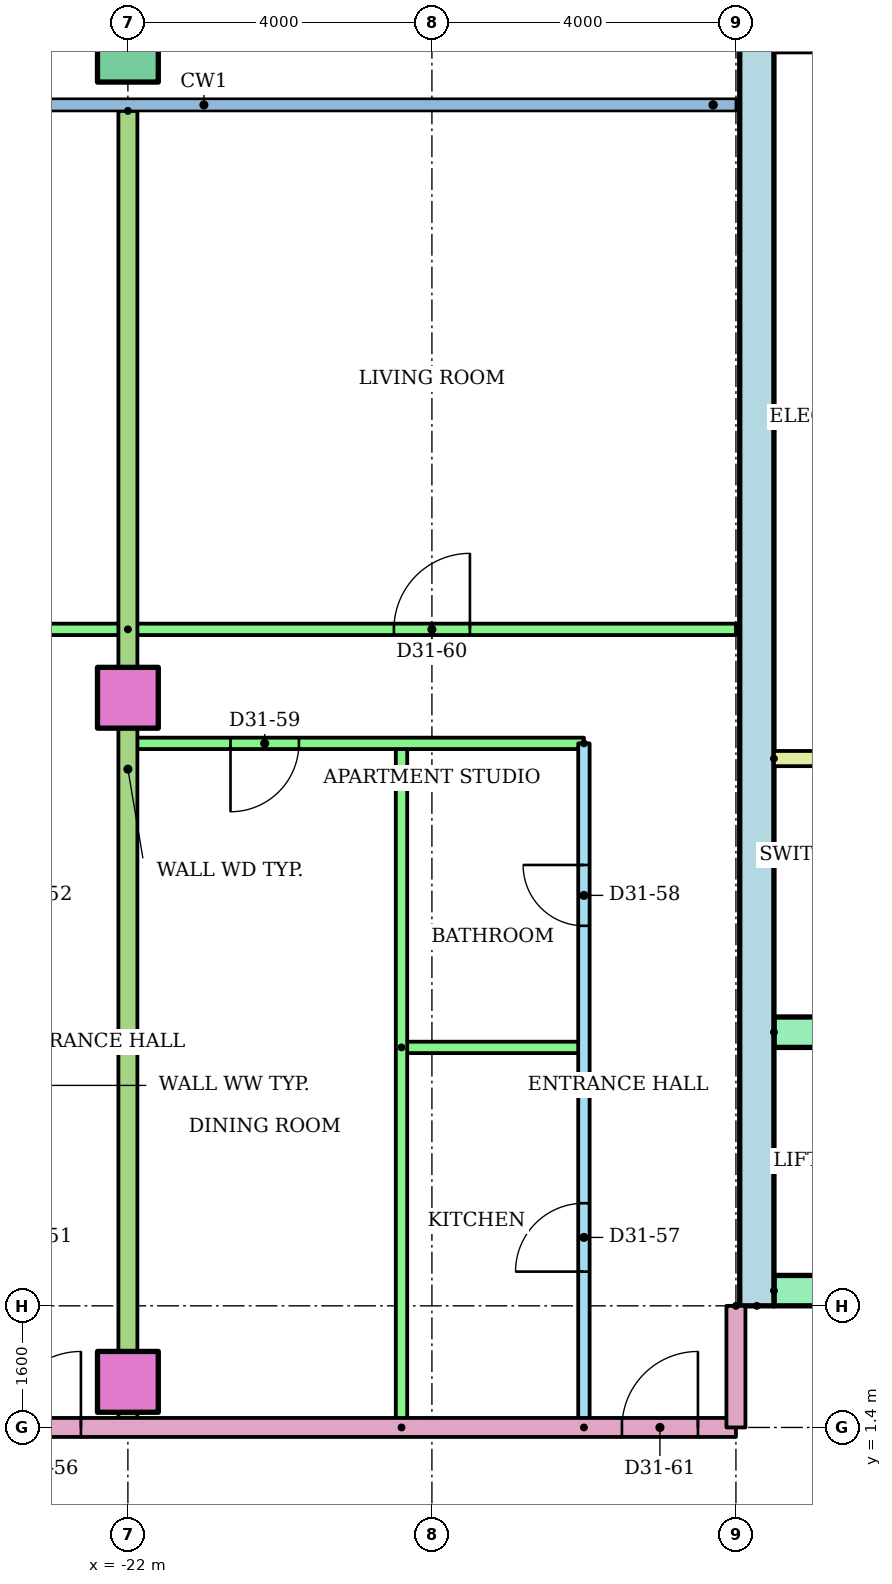
"""IFC4 building model, lengths in metres.
Left out: names, types, materials, properties, quantities, classifications, styles, units other than length and angle.
Written with IfcOpenShell. Run it as: python <this file> out.ifc"""

import sys

from ifc_helpers import new_model, si_unit, direction, frame, frame_2d, origin, origin_2d, place, context, subcontext, project, spatial, rectangle, hollow_rectangle, extrude, element, fill, save


model = new_model("IFC4")
c1 = context("Model", 3, precision=1e-05, world=origin(), true_north=direction((0.0, 1.0)))
c2 = subcontext(c1, "Body", "Model", "MODEL_VIEW")
j1 = project(units=[si_unit("LENGTHUNIT", "METRE"), si_unit("PLANEANGLEUNIT", "RADIAN")], contexts=[c1])
p1 = place(None, origin())
s1 = spatial("IfcSite", under=j1, at=p1, CompositionType="ELEMENT")
p2 = place(p1, origin())
s2 = spatial("IfcBuilding", under=s1, at=p2, CompositionType="ELEMENT")
p3 = place(p2, frame((0.0, 0.0, 123.0)))
s3 = spatial("IfcBuildingStorey", under=s2, at=p3, CompositionType="ELEMENT", Elevation=123.0)
for number, where in (
    (1, (-22.0, 2.0, 0.0)),
    (2, (-22.0, 11.0, 0.0)),
):
    element("IfcColumn", number, at=place(p3, frame(where)), inside=s3, PredefinedType="COLUMN", context=c2, shape_type="SweptSolid", body=[
        extrude(rectangle(XDim=0.8, YDim=0.8, at=origin_2d()), origin(), (0.0, 0.0, 1.0), 3.2),
    ])
p4 = place(p3, frame((-22.0, 19.5, 0.0)))
e3 = element("IfcColumn", 3, at=p4, inside=s3, PredefinedType="COLUMN", context=c2, shape_type="SweptSolid", body=[
    extrude(hollow_rectangle(XDim=0.8, YDim=0.8, WallThickness=0.04, at=origin_2d()), origin(), (0.0, 0.0, 1.0), 3.2),
])
p5 = place(p3, frame((-13.725, 3.0, 0.0), z_axis=(0.0, 0.0, 1.0), x_axis=(0.0, 1.0, 0.0)))
e4 = element("IfcWall", 4, at=p5, inside=s3, PredefinedType="SHEAR", context=c2, shape_type="SweptSolid", body=[
    extrude(rectangle(XDim=17.0, YDim=0.45, at=frame_2d((8.5, 0.0))), origin(), (0.0, 0.0, 1.0), 2.92),
])
p6 = place(p3, frame((-13.5, 3.2, 0.0)))
e5 = element("IfcWall", 5, at=p6, inside=s3, PredefinedType="SHEAR", context=c2, shape_type="SweptSolid", body=[
    extrude(rectangle(XDim=27.0, YDim=0.4, at=frame_2d((13.5, 0.0))), origin(), (0.0, 0.0, 1.0), 2.92),
])
p7 = place(p6, frame((6.861, 0.0, 0.0)))
e6 = element("IfcOpeningElement", 6, at=p7, cuts=e5, PredefinedType="OPENING", context=c2, shape_type="SweptSolid", body=[
    extrude(rectangle(XDim=1.1, YDim=2.1, at=frame_2d((0.55, 1.05))), frame((0.0, 0.21, 0.0), z_axis=(0.0, -1.0, 0.0), x_axis=(1.0, 0.0, 0.0)), (0.0, 0.0, 1.0), 0.42),
])
p8 = place(p6, frame((9.906, 0.0, 0.0)))
e7 = element("IfcOpeningElement", 7, at=p8, cuts=e5, PredefinedType="OPENING", context=c2, shape_type="SweptSolid", body=[
    extrude(rectangle(XDim=1.1, YDim=2.1, at=frame_2d((0.55, 1.05))), frame((0.0, 0.21, 0.0), z_axis=(0.0, -1.0, 0.0), x_axis=(1.0, 0.0, 0.0)), (0.0, 0.0, 1.0), 0.42),
])
p9 = place(p6, frame((15.994, 0.0, 0.0)))
e8 = element("IfcOpeningElement", 8, at=p9, cuts=e5, PredefinedType="OPENING", context=c2, shape_type="SweptSolid", body=[
    extrude(rectangle(XDim=1.1, YDim=2.1, at=frame_2d((0.55, 1.05))), frame((0.0, 0.21, 0.0), z_axis=(0.0, -1.0, 0.0), x_axis=(1.0, 0.0, 0.0)), (0.0, 0.0, 1.0), 0.42),
])
p10 = place(p6, frame((19.039, 0.0, 0.0)))
e9 = element("IfcOpeningElement", 9, at=p10, cuts=e5, PredefinedType="OPENING", context=c2, shape_type="SweptSolid", body=[
    extrude(rectangle(XDim=1.1, YDim=2.1, at=frame_2d((0.55, 1.05))), frame((0.0, 0.21, 0.0), z_axis=(0.0, -1.0, 0.0), x_axis=(1.0, 0.0, 0.0)), (0.0, 0.0, 1.0), 0.42),
])
p11 = place(p6, frame((12.6, 0.0, 0.0)))
e10 = element("IfcOpeningElement", 10, at=p11, cuts=e5, PredefinedType="OPENING", context=c2, shape_type="SweptSolid", body=[
    extrude(rectangle(XDim=1.8, YDim=2.1, at=frame_2d((0.9, 1.05))), frame((0.0, 0.21, 0.0), z_axis=(0.0, -1.0, 0.0), x_axis=(1.0, 0.0, 0.0)), (0.0, 0.0, 1.0), 0.42),
])
p12 = place(p3, frame((-13.5, 6.6, 0.0)))
e11 = element("IfcWall", 11, at=p12, inside=s3, PredefinedType="SHEAR", context=c2, shape_type="SweptSolid", body=[
    extrude(rectangle(XDim=11.978, YDim=0.4, at=frame_2d((5.989, 0.0))), origin(), (0.0, 0.0, 1.0), 2.92),
])
p13 = place(p3, frame((-13.5, 10.2, 0.0)))
e12 = element("IfcWall", 12, at=p13, inside=s3, PredefinedType="PARTITIONING", context=c2, shape_type="SweptSolid", body=[
    extrude(rectangle(XDim=3.9, YDim=0.2, at=frame_2d((1.95, 0.0))), origin(), (0.0, 0.0, 1.0), 2.92),
])
p14 = place(p3, frame((-32.72, 11.9, 0.0)))
e13 = element("IfcWall", 13, at=p14, inside=s3, PredefinedType="PARTITIONING", context=c2, shape_type="SweptSolid", body=[
    extrude(rectangle(XDim=10.72, YDim=0.15, at=frame_2d((5.36, 0.0))), origin(), (0.0, 0.0, 1.0), 2.4),
])
p15 = place(p14, frame((1.102, 0.0, 0.0)))
e14 = element("IfcOpeningElement", 14, at=p15, cuts=e13, PredefinedType="OPENING", context=c2, shape_type="SweptSolid", body=[
    extrude(rectangle(XDim=1.0, YDim=2.1, at=frame_2d((0.5, 1.05))), frame((0.0, 0.085, 0.0), z_axis=(0.0, -1.0, 0.0), x_axis=(1.0, 0.0, 0.0)), (0.0, 0.0, 1.0), 0.17),
])
p16 = place(p14, frame((7.22, 0.0, 0.0)))
e15 = element("IfcOpeningElement", 15, at=p16, cuts=e13, PredefinedType="OPENING", context=c2, shape_type="SweptSolid", body=[
    extrude(rectangle(XDim=1.0, YDim=2.1, at=frame_2d((0.5, 1.05))), frame((0.0, 0.085, 0.0), z_axis=(0.0, -1.0, 0.0), x_axis=(1.0, 0.0, 0.0)), (0.0, 0.0, 1.0), 0.17),
])
p17 = place(p3, frame((-16.0, 1.4, 0.0), z_axis=(0.0, 0.0, 1.0), x_axis=(0.0, 1.0, 0.0)))
e16 = element("IfcWall", 16, at=p17, inside=s3, PredefinedType="PARTITIONING", context=c2, shape_type="SweptSolid", body=[
    extrude(rectangle(XDim=9.0, YDim=0.15, at=frame_2d((4.5, 0.0))), origin(), (0.0, 0.0, 1.0), 2.4),
])
p18 = place(p17, frame((2.05, 0.0, 0.0)))
e17 = element("IfcOpeningElement", 17, at=p18, cuts=e16, PredefinedType="OPENING", context=c2, shape_type="SweptSolid", body=[
    extrude(rectangle(XDim=0.9, YDim=2.1, at=frame_2d((0.45, 1.05))), frame((0.0, 0.085, 0.0), z_axis=(0.0, -1.0, 0.0), x_axis=(1.0, 0.0, 0.0)), (0.0, 0.0, 1.0), 0.17),
])
p19 = place(p17, frame((6.6, 0.0, 0.0)))
e18 = element("IfcOpeningElement", 18, at=p19, cuts=e16, PredefinedType="OPENING", context=c2, shape_type="SweptSolid", body=[
    extrude(rectangle(XDim=0.8, YDim=2.1, at=frame_2d((0.4, 1.05))), frame((0.0, 0.085, 0.0), z_axis=(0.0, -1.0, 0.0), x_axis=(1.0, 0.0, 0.0)), (0.0, 0.0, 1.0), 0.17),
])
p20 = place(p3, frame((-18.4, 6.4, 0.0)))
e19 = element("IfcWall", 19, at=p20, inside=s3, PredefinedType="PARTITIONING", context=c2, shape_type="SweptSolid", body=[
    extrude(rectangle(XDim=2.4, YDim=0.15, at=frame_2d((1.2, 0.0))), origin(), (0.0, 0.0, 1.0), 2.4),
])
p21 = place(p3, frame((-18.4, 1.4, 0.0), z_axis=(0.0, 0.0, 1.0), x_axis=(0.0, 1.0, 0.0)))
e20 = element("IfcWall", 20, at=p21, inside=s3, PredefinedType="PARTITIONING", context=c2, shape_type="SweptSolid", body=[
    extrude(rectangle(XDim=9.0, YDim=0.15, at=frame_2d((4.5, 0.0))), origin(), (0.0, 0.0, 1.0), 2.4),
])
p22 = place(p3, frame((-16.0, 10.4, 0.0), z_axis=(0.0, 0.0, 1.0), x_axis=(-1.0, 0.0, 0.0)))
e21 = element("IfcWall", 21, at=p22, inside=s3, PredefinedType="PARTITIONING", context=c2, shape_type="SweptSolid", body=[
    extrude(rectangle(XDim=6.0, YDim=0.15, at=frame_2d((3.0, 0.0))), origin(), (0.0, 0.0, 1.0), 2.4),
])
p23 = place(p22, frame((3.75, 0.0, 0.0)))
e22 = element("IfcOpeningElement", 22, at=p23, cuts=e21, PredefinedType="OPENING", context=c2, shape_type="SweptSolid", body=[
    extrude(rectangle(XDim=0.9, YDim=2.1, at=frame_2d((0.45, 1.05))), frame((0.0, 0.085, 0.0), z_axis=(0.0, -1.0, 0.0), x_axis=(1.0, 0.0, 0.0)), (0.0, 0.0, 1.0), 0.17),
])
p24 = place(p3, frame((-22.0, 11.9, 0.0)))
e23 = element("IfcWall", 23, at=p24, inside=s3, PredefinedType="PARTITIONING", context=c2, shape_type="SweptSolid", body=[
    extrude(rectangle(XDim=8.0, YDim=0.15, at=frame_2d((4.0, 0.0))), origin(), (0.0, 0.0, 1.0), 2.4),
])
p25 = place(p24, frame((3.5, 0.0, 0.0)))
e24 = element("IfcOpeningElement", 24, at=p25, cuts=e23, PredefinedType="OPENING", context=c2, shape_type="SweptSolid", body=[
    extrude(rectangle(XDim=1.0, YDim=2.1, at=frame_2d((0.5, 1.05))), frame((0.0, 0.085, 0.0), z_axis=(0.0, -1.0, 0.0), x_axis=(1.0, 0.0, 0.0)), (0.0, 0.0, 1.0), 0.17),
])
p26 = place(p3, frame((-22.0, 18.721, 0.0), z_axis=(0.0, 0.0, 1.0), x_axis=(0.0, -1.0, 0.0)))
e25 = element("IfcWall", 25, at=p26, inside=s3, PredefinedType="PARTITIONING", context=c2, shape_type="SweptSolid", body=[
    extrude(rectangle(XDim=17.321, YDim=0.25, at=frame_2d((8.661, 0.0))), origin(), (0.0, 0.0, 1.0), 2.4),
])
p27 = place(p3, frame((-29.0, 1.4, 0.0)))
e26 = element("IfcWall", 26, at=p27, inside=s3, PredefinedType="PARTITIONING", context=c2, shape_type="SweptSolid", body=[
    extrude(rectangle(XDim=15.0, YDim=0.25, at=frame_2d((7.5, 0.0))), origin(), (0.0, 0.0, 1.0), 2.4),
])
p28 = place(p27, frame((5.382, 0.0, 0.0)))
e27 = element("IfcOpeningElement", 27, at=p28, cuts=e26, PredefinedType="OPENING", context=c2, shape_type="SweptSolid", body=[
    extrude(rectangle(XDim=1.0, YDim=2.1, at=frame_2d((0.5, 1.05))), frame((0.0, 0.135, 0.0), z_axis=(0.0, -1.0, 0.0), x_axis=(1.0, 0.0, 0.0)), (0.0, 0.0, 1.0), 0.27),
])
p29 = place(p27, frame((13.5, 0.0, 0.0)))
e28 = element("IfcOpeningElement", 28, at=p29, cuts=e26, PredefinedType="OPENING", context=c2, shape_type="SweptSolid", body=[
    extrude(rectangle(XDim=1.0, YDim=2.1, at=frame_2d((0.5, 1.05))), frame((0.0, 0.135, 0.0), z_axis=(0.0, -1.0, 0.0), x_axis=(1.0, 0.0, 0.0)), (0.0, 0.0, 1.0), 0.27),
])
p30 = place(p3, frame((-14.0, 3.0, 0.0), z_axis=(0.0, 0.0, 1.0), x_axis=(0.0, -1.0, 0.0)))
e29 = element("IfcWall", 29, at=p30, inside=s3, PredefinedType="PARTITIONING", context=c2, shape_type="SweptSolid", body=[
    extrude(rectangle(XDim=1.6, YDim=0.25, at=frame_2d((0.8, 0.0))), origin(), (0.0, 0.0, 1.0), 2.4),
])
p31 = place(p28, origin())
e30 = element("IfcDoor", 30, at=p31, inside=s3, OperationType="SINGLE_SWING_RIGHT", PredefinedType="DOOR", context=c2, shape_type="SweptSolid", body=[
    extrude(rectangle(XDim=1.0, YDim=2.1, at=frame_2d((0.5, 1.05))), frame((0.0, 0.025, 0.0), z_axis=(0.0, -1.0, 0.0), x_axis=(1.0, 0.0, 0.0)), (0.0, 0.0, 1.0), 0.05),
])
fill(e27, e30)
p32 = place(p18, origin())
e31 = element("IfcDoor", 31, at=p32, inside=s3, OperationType="SINGLE_SWING_LEFT", PredefinedType="DOOR", context=c2, shape_type="SweptSolid", body=[
    extrude(rectangle(XDim=0.9, YDim=2.1, at=frame_2d((0.45, 1.05))), frame((0.0, 0.025, 0.0), z_axis=(0.0, -1.0, 0.0), x_axis=(1.0, 0.0, 0.0)), (0.0, 0.0, 1.0), 0.05),
])
fill(e17, e31)
p33 = place(p19, origin())
e32 = element("IfcDoor", 32, at=p33, inside=s3, OperationType="SINGLE_SWING_RIGHT", PredefinedType="DOOR", context=c2, shape_type="SweptSolid", body=[
    extrude(rectangle(XDim=0.8, YDim=2.1, at=frame_2d((0.4, 1.05))), frame((0.0, 0.025, 0.0), z_axis=(0.0, -1.0, 0.0), x_axis=(1.0, 0.0, 0.0)), (0.0, 0.0, 1.0), 0.05),
])
fill(e18, e32)
p34 = place(p23, origin())
e33 = element("IfcDoor", 33, at=p34, inside=s3, OperationType="SINGLE_SWING_RIGHT", PredefinedType="DOOR", context=c2, shape_type="SweptSolid", body=[
    extrude(rectangle(XDim=0.9, YDim=2.1, at=frame_2d((0.45, 1.05))), frame((0.0, 0.025, 0.0), z_axis=(0.0, -1.0, 0.0), x_axis=(1.0, 0.0, 0.0)), (0.0, 0.0, 1.0), 0.05),
])
fill(e22, e33)
p35 = place(p25, origin())
e34 = element("IfcDoor", 34, at=p35, inside=s3, OperationType="SINGLE_SWING_RIGHT", PredefinedType="DOOR", context=c2, shape_type="SweptSolid", body=[
    extrude(rectangle(XDim=1.0, YDim=2.1, at=frame_2d((0.5, 1.05))), frame((0.0, 0.025, 0.0), z_axis=(0.0, -1.0, 0.0), x_axis=(1.0, 0.0, 0.0)), (0.0, 0.0, 1.0), 0.05),
])
fill(e24, e34)
p36 = place(p29, origin())
e35 = element("IfcDoor", 35, at=p36, inside=s3, OperationType="SINGLE_SWING_RIGHT", PredefinedType="DOOR", context=c2, shape_type="SweptSolid", body=[
    extrude(rectangle(XDim=1.0, YDim=2.1, at=frame_2d((0.5, 1.05))), frame((0.0, 0.025, 0.0), z_axis=(0.0, -1.0, 0.0), x_axis=(1.0, 0.0, 0.0)), (0.0, 0.0, 1.0), 0.05),
])
fill(e28, e35)
save(model, sys.argv[1])
